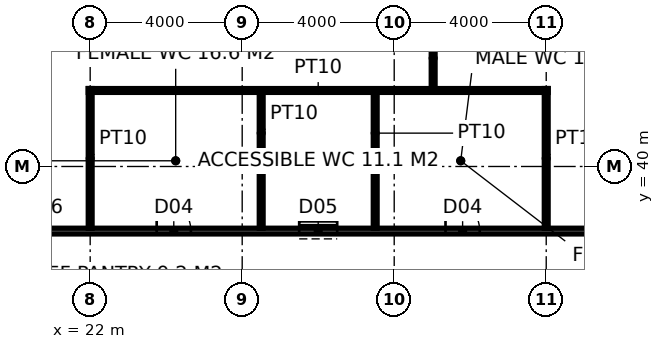
"""IFC4 building model, lengths in metres.
Left out: names, types, materials, properties, quantities, classifications, styles, units other than length and angle.
Written with IfcOpenShell. Run it as: python <this file> out.ifc"""

import sys

from ifc_helpers import new_model, si_unit, direction, frame, frame_2d, origin, place, context, subcontext, project, spatial, rectangle, extrude, element, fill, save


model = new_model("IFC4")
c1 = context("Model", 3, precision=1e-05, world=origin(), true_north=direction((0.0, 1.0)))
c2 = subcontext(c1, "Body", "Model", "MODEL_VIEW")
j1 = project(units=[si_unit("LENGTHUNIT", "METRE"), si_unit("PLANEANGLEUNIT", "RADIAN")], contexts=[c1])
p1 = place(None, origin())
s1 = spatial("IfcSite", under=j1, at=p1, CompositionType="ELEMENT")
p2 = place(p1, origin())
s2 = spatial("IfcBuilding", under=s1, at=p2, CompositionType="ELEMENT")
p3 = place(p2, frame((0.0, 0.0, 242.2)))
s3 = spatial("IfcBuildingStorey", under=s2, at=p3, CompositionType="ELEMENT", Elevation=242.2)
p4 = place(p3, frame((17.5, 38.3, 0.0), z_axis=(0.0, 0.0, 1.0), x_axis=(1.0, 0.0, 0.0)))
e1 = element("IfcWall", 1, at=p4, inside=s3, PredefinedType="PARTITIONING", context=c2, shape_type="SweptSolid", body=[
    extrude(rectangle(XDim=20.925, YDim=0.15, at=frame_2d((10.462, 0.0))), origin(), (0.0, 0.0, 1.0), 3.85),
])
p5 = place(p4, frame((6.25, 0.0, 0.0)))
e2 = element("IfcOpeningElement", 2, at=p5, cuts=e1, PredefinedType="OPENING", context=c2, shape_type="SweptSolid", body=[
    extrude(rectangle(XDim=0.9, YDim=2.1, at=frame_2d((0.45, 1.05))), frame((0.0, 0.085, 0.0), z_axis=(0.0, -1.0, 0.0), x_axis=(1.0, 0.0, 0.0)), (0.0, 0.0, 1.0), 0.17),
])
p6 = place(p4, frame((10.0, 0.0, 0.0)))
e3 = element("IfcOpeningElement", 3, at=p6, cuts=e1, PredefinedType="OPENING", context=c2, shape_type="SweptSolid", body=[
    extrude(rectangle(XDim=1.0, YDim=2.1, at=frame_2d((0.5, 1.05))), frame((0.0, 0.085, 0.0), z_axis=(0.0, -1.0, 0.0), x_axis=(1.0, 0.0, 0.0)), (0.0, 0.0, 1.0), 0.17),
])
p7 = place(p4, frame((13.85, 0.0, 0.0)))
e4 = element("IfcOpeningElement", 4, at=p7, cuts=e1, PredefinedType="OPENING", context=c2, shape_type="SweptSolid", body=[
    extrude(rectangle(XDim=0.9, YDim=2.1, at=frame_2d((0.45, 1.05))), frame((0.0, 0.085, 0.0), z_axis=(0.0, -1.0, 0.0), x_axis=(1.0, 0.0, 0.0)), (0.0, 0.0, 1.0), 0.17),
])
for number, where, z_axis, x_axis in (
    (5, (22.0, 38.375, 0.0), (0.0, 0.0, 1.0), (0.0, 1.0, 0.0)),
    (6, (34.0, 38.375, 0.0), (0.0, 0.0, 1.0), (0.0, 1.0, 0.0)),
):
    element("IfcWall", number, at=place(p3, frame(where, z_axis=z_axis, x_axis=x_axis)), inside=s3, PredefinedType="PARTITIONING", context=c2, shape_type="SweptSolid", body=[
        extrude(rectangle(XDim=3.675, YDim=0.1, at=frame_2d((1.837, 0.0))), origin(), (0.0, 0.0, 1.0), 2.95),
    ])
p8 = place(p3, frame((21.95, 42.0, 0.0), z_axis=(0.0, 0.0, 1.0), x_axis=(1.0, 0.0, 0.0)))
e7 = element("IfcWall", 7, at=p8, inside=s3, PredefinedType="PARTITIONING", context=c2, shape_type="SweptSolid", body=[
    extrude(rectangle(XDim=12.1, YDim=0.1, at=frame_2d((6.05, 0.0))), origin(), (0.0, 0.0, 1.0), 3.85),
])
for number, where, z_axis, x_axis in (
    (8, (26.5, 38.375, 0.0), (0.0, 0.0, 1.0), (0.0, 1.0, 0.0)),
    (9, (29.5, 38.375, 0.0), (0.0, 0.0, 1.0), (0.0, 1.0, 0.0)),
):
    element("IfcWall", number, at=place(p3, frame(where, z_axis=z_axis, x_axis=x_axis)), inside=s3, PredefinedType="PARTITIONING", context=c2, shape_type="SweptSolid", body=[
        extrude(rectangle(XDim=3.575, YDim=0.1, at=frame_2d((1.788, 0.0))), origin(), (0.0, 0.0, 1.0), 3.85),
    ])
p9 = place(p3, frame((31.025, 43.7, 0.0), z_axis=(0.0, 0.0, 1.0), x_axis=(0.0, -1.0, 0.0)))
e10 = element("IfcWall", 10, at=p9, inside=s3, PredefinedType="PARTITIONING", context=c2, shape_type="SweptSolid", body=[
    extrude(rectangle(XDim=1.7, YDim=0.1, at=frame_2d((0.85, 0.0))), origin(), (0.0, 0.0, 1.0), 3.85),
])
p10 = place(p5, origin())
e11 = element("IfcDoor", 11, at=p10, inside=s3, OperationType="SINGLE_SWING_LEFT", PredefinedType="DOOR", context=c2, shape_type="SweptSolid", body=[
    extrude(rectangle(XDim=0.9, YDim=2.1, at=frame_2d((0.45, 1.05))), frame((0.0, 0.025, 0.0), z_axis=(0.0, -1.0, 0.0), x_axis=(1.0, 0.0, 0.0)), (0.0, 0.0, 1.0), 0.05),
])
fill(e2, e11)
p11 = place(p6, origin())
e12 = element("IfcDoor", 12, at=p11, inside=s3, OperationType="SLIDING_TO_LEFT", PredefinedType="DOOR", context=c2, shape_type="SweptSolid", body=[
    extrude(rectangle(XDim=1.0, YDim=2.1, at=frame_2d((0.5, 1.05))), frame((0.0, 0.025, 0.0), z_axis=(0.0, -1.0, 0.0), x_axis=(1.0, 0.0, 0.0)), (0.0, 0.0, 1.0), 0.05),
])
fill(e3, e12)
p12 = place(p7, origin())
e13 = element("IfcDoor", 13, at=p12, inside=s3, OperationType="SINGLE_SWING_LEFT", PredefinedType="DOOR", context=c2, shape_type="SweptSolid", body=[
    extrude(rectangle(XDim=0.9, YDim=2.1, at=frame_2d((0.45, 1.05))), frame((0.0, 0.025, 0.0), z_axis=(0.0, -1.0, 0.0), x_axis=(1.0, 0.0, 0.0)), (0.0, 0.0, 1.0), 0.05),
])
fill(e4, e13)
save(model, sys.argv[1])
